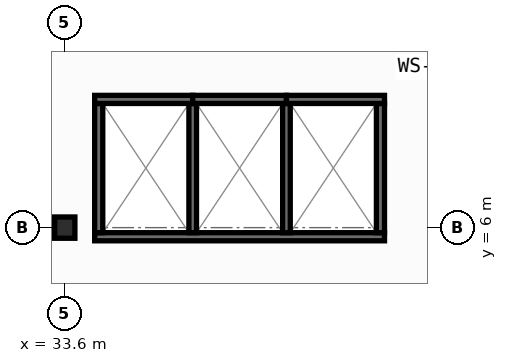
"""IFC4 building model, lengths in metres.
Left out: names, types, materials, properties, quantities, classifications, styles, units other than length and angle.
Written with IfcOpenShell. Run it as: python <this file> out.ifc"""

import sys

from ifc_helpers import new_model, si_unit, direction, frame, frame_2d, origin, origin_2d, place, context, subcontext, project, spatial, rectangle, i_section, extrude, element, save


model = new_model("IFC4")
c1 = context("Model", 3, precision=1e-05, world=origin(), true_north=direction((0.0, 1.0)))
c2 = subcontext(c1, "Body", "Model", "MODEL_VIEW")
j1 = project(units=[si_unit("LENGTHUNIT", "METRE"), si_unit("PLANEANGLEUNIT", "RADIAN")], contexts=[c1])
p1 = place(None, origin())
s1 = spatial("IfcSite", under=j1, at=p1, CompositionType="ELEMENT")
p2 = place(p1, origin())
s2 = spatial("IfcBuilding", under=s1, at=p2, CompositionType="ELEMENT")
p3 = place(p2, frame((0.0, 0.0, 9.0)))
s3 = spatial("IfcBuildingStorey", under=s2, at=p3, CompositionType="ELEMENT", Elevation=9.0)
p4 = place(p3, frame((33.6, 6.0, 0.0), z_axis=(0.0, 0.0, 1.0), x_axis=(1.0, 0.0, 0.0)))
e1 = element("IfcColumn", 1, at=p4, inside=s3, PredefinedType="COLUMN", context=c2, shape_type="SweptSolid", body=[
    extrude(i_section(OverallWidth=0.4, OverallDepth=0.42, WebThickness=0.025, FlangeThickness=0.04, at=origin_2d()), origin(), (0.0, 0.0, 1.0), 4.5),
])
p5 = place(p3, frame((34.19, 5.82, 0.0), z_axis=(0.0, 0.0, 1.0), x_axis=(1.0, 0.0, 0.0)))
e2 = element("IfcWall", 2, at=p5, inside=s3, PredefinedType="SHEAR", context=c2, shape_type="SweptSolid", body=[
    extrude(rectangle(XDim=5.72, YDim=0.16, at=frame_2d((2.86, 0.0))), origin(), (0.0, 0.0, 1.0), 4.25),
])
for number, where, z_axis, x_axis in (
    (3, (34.27, 5.9, 0.0), (0.0, 0.0, 1.0), (0.0, 1.0, 0.0)),
    (4, (39.83, 5.9, 0.0), (0.0, 0.0, 1.0), (0.0, 1.0, 0.0)),
):
    element("IfcWall", number, at=place(p3, frame(where, z_axis=z_axis, x_axis=x_axis)), inside=s3, PredefinedType="SHEAR", context=c2, shape_type="SweptSolid", body=[
        extrude(rectangle(XDim=2.55, YDim=0.16, at=frame_2d((1.275, 0.0))), origin(), (0.0, 0.0, 1.0), 4.25),
    ])
for number, where, z_axis, x_axis in (
    (5, (36.125, 5.9, 0.0), (0.0, 0.0, 1.0), (0.0, 1.0, 0.0)),
    (6, (37.975, 5.9, 0.0), (0.0, 0.0, 1.0), (0.0, 1.0, 0.0)),
):
    element("IfcWall", number, at=place(p3, frame(where, z_axis=z_axis, x_axis=x_axis)), inside=s3, PredefinedType="SHEAR", context=c2, shape_type="SweptSolid", body=[
        extrude(rectangle(XDim=2.55, YDim=0.15, at=frame_2d((1.275, 0.0))), origin(), (0.0, 0.0, 1.0), 4.25),
    ])
p6 = place(p3, frame((34.19, 8.53, 0.0), z_axis=(0.0, 0.0, 1.0), x_axis=(1.0, 0.0, 0.0)))
e7 = element("IfcWall", 7, at=p6, inside=s3, PredefinedType="SHEAR", context=c2, shape_type="SweptSolid", body=[
    extrude(rectangle(XDim=1.935, YDim=0.16, at=frame_2d((0.968, 0.0))), origin(), (0.0, 0.0, 1.0), 4.25),
])
p7 = place(p3, frame((36.125, 8.53, 0.0), z_axis=(0.0, 0.0, 1.0), x_axis=(1.0, 0.0, 0.0)))
e8 = element("IfcWall", 8, at=p7, inside=s3, PredefinedType="SHEAR", context=c2, shape_type="SweptSolid", body=[
    extrude(rectangle(XDim=1.85, YDim=0.16, at=frame_2d((0.925, 0.0))), origin(), (0.0, 0.0, 1.0), 4.25),
])
p8 = place(p3, frame((37.975, 8.53, 0.0), z_axis=(0.0, 0.0, 1.0), x_axis=(1.0, 0.0, 0.0)))
e9 = element("IfcWall", 9, at=p8, inside=s3, PredefinedType="SHEAR", context=c2, shape_type="SweptSolid", body=[
    extrude(rectangle(XDim=1.935, YDim=0.16, at=frame_2d((0.967, 0.0))), origin(), (0.0, 0.0, 1.0), 4.25),
])
save(model, sys.argv[1])
